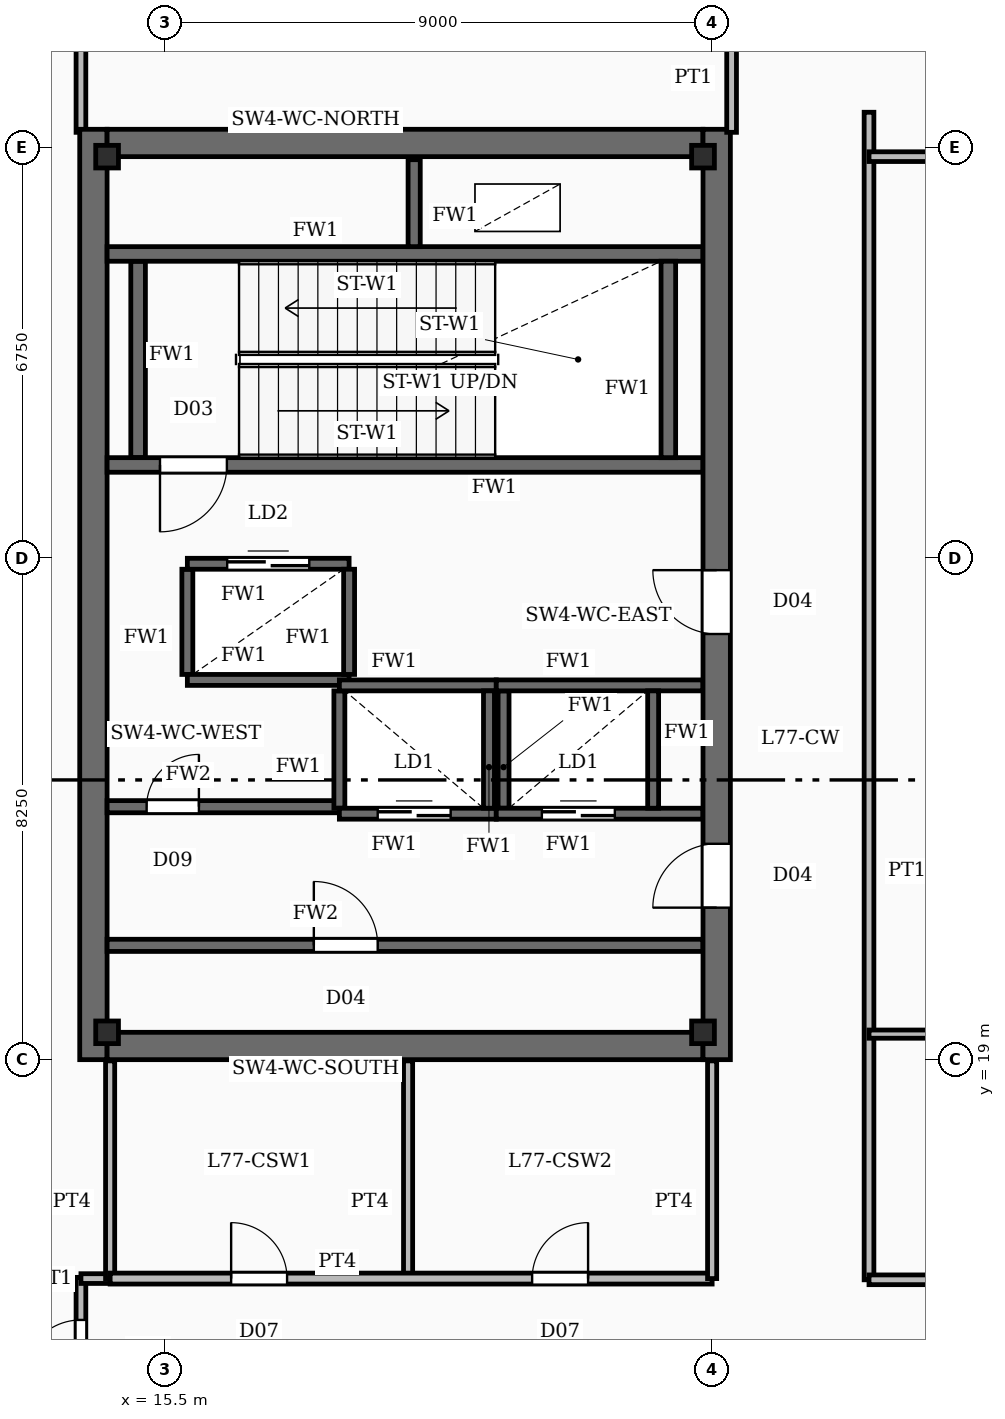
"""IFC4 building model, lengths in metres.
Left out: names, types, materials, properties, quantities, classifications, styles, units other than length and angle.
Written with IfcOpenShell. Run it as: python <this file> out.ifc"""

import sys

from ifc_helpers import new_model, si_unit, direction, frame, frame_2d, origin, origin_2d, place, context, subcontext, project, spatial, rectangle, i_section, extrude, element, fill, save


model = new_model("IFC4")
c1 = context("Model", 3, precision=1e-05, world=origin(), true_north=direction((0.0, 1.0)))
c2 = subcontext(c1, "Body", "Model", "MODEL_VIEW")
j1 = project(units=[si_unit("LENGTHUNIT", "METRE"), si_unit("PLANEANGLEUNIT", "RADIAN")], contexts=[c1])
p1 = place(None, origin())
s1 = spatial("IfcSite", under=j1, at=p1, CompositionType="ELEMENT")
p2 = place(p1, origin())
s2 = spatial("IfcBuilding", under=s1, at=p2, CompositionType="ELEMENT")
p3 = place(p2, frame((0.0, 0.0, 312.4)))
s3 = spatial("IfcBuildingStorey", under=s2, at=p3, CompositionType="ELEMENT", Elevation=312.4)
p4 = place(p3, frame((14.325, 19.0, -0.24), z_axis=(0.0, 0.0, 1.0), x_axis=(0.0, 1.0, 0.0)))
e1 = element("IfcWall", 1, at=p4, inside=s3, PredefinedType="SHEAR", context=c2, shape_type="SweptSolid", body=[
    extrude(rectangle(XDim=15.3, YDim=0.45, at=frame_2d((7.65, 0.0))), origin(), (0.0, 0.0, 1.0), 4.8),
])
p5 = place(p3, frame((24.575, 19.0, -0.24), z_axis=(0.0, 0.0, 1.0), x_axis=(0.0, 1.0, 0.0)))
e2 = element("IfcWall", 2, at=p5, inside=s3, PredefinedType="SHEAR", context=c2, shape_type="SweptSolid", body=[
    extrude(rectangle(XDim=15.3, YDim=0.45, at=frame_2d((7.65, 0.0))), origin(), (0.0, 0.0, 1.0), 4.8),
])
p6 = place(p5, frame((2.5, 0.0, 0.24)))
e3 = element("IfcOpeningElement", 3, at=p6, cuts=e2, PredefinedType="OPENING", context=c2, shape_type="SweptSolid", body=[
    extrude(rectangle(XDim=1.05, YDim=2.15, at=frame_2d((0.525, 1.075))), frame((0.0, 0.235, 0.0), z_axis=(0.0, -1.0, 0.0), x_axis=(1.0, 0.0, 0.0)), (0.0, 0.0, 1.0), 0.47),
])
p7 = place(p5, frame((7.0, 0.0, 0.24)))
e4 = element("IfcOpeningElement", 4, at=p7, cuts=e2, PredefinedType="OPENING", context=c2, shape_type="SweptSolid", body=[
    extrude(rectangle(XDim=1.05, YDim=2.15, at=frame_2d((0.525, 1.075))), frame((0.0, 0.235, 0.0), z_axis=(0.0, -1.0, 0.0), x_axis=(1.0, 0.0, 0.0)), (0.0, 0.0, 1.0), 0.47),
])
for number, where, z_axis, x_axis in (
    (5, (14.55, 19.225, -0.24), (0.0, 0.0, 1.0), (1.0, 0.0, 0.0)),
    (6, (14.55, 34.075, -0.24), (0.0, 0.0, 1.0), (1.0, 0.0, 0.0)),
):
    element("IfcWall", number, at=place(p3, frame(where, z_axis=z_axis, x_axis=x_axis)), inside=s3, PredefinedType="SHEAR", context=c2, shape_type="SweptSolid", body=[
        extrude(rectangle(XDim=9.8, YDim=0.45, at=frame_2d((4.9, 0.0))), origin(), (0.0, 0.0, 1.0), 4.8),
    ])
for number, where, z_axis, x_axis in (
    (7, (14.55, 19.45, -0.24), (0.0, 0.0, 1.0), (1.0, 0.0, 0.0)),
    (8, (24.35, 19.45, -0.24), (0.0, 0.0, 1.0), (1.0, 0.0, 0.0)),
    (9, (14.55, 33.85, -0.24), (0.0, 0.0, 1.0), (1.0, 0.0, 0.0)),
    (10, (24.35, 33.85, -0.24), (0.0, 0.0, 1.0), (1.0, 0.0, 0.0)),
):
    element("IfcColumn", number, at=place(p3, frame(where, z_axis=z_axis, x_axis=x_axis)), inside=s3, PredefinedType="COLUMN", context=c2, shape_type="SweptSolid", body=[
        extrude(i_section(OverallWidth=0.374, OverallDepth=0.372, WebThickness=0.016, FlangeThickness=0.026, FilletRadius=0.02, at=origin_2d()), origin(), (0.0, 0.0, 1.0), 4.8),
    ])
p8 = place(p3, frame((24.35, 28.78, 0.0), z_axis=(0.0, 0.0, 1.0), x_axis=(-1.0, 0.0, 0.0)))
e11 = element("IfcWall", 11, at=p8, inside=s3, PredefinedType="SOLIDWALL", context=c2, shape_type="SweptSolid", body=[
    extrude(rectangle(XDim=9.8, YDim=0.24, at=frame_2d((4.9, 0.0))), origin(), (0.0, 0.0, 1.0), 4.56),
])
p9 = place(p8, frame((7.83, 0.0, 0.0)))
e12 = element("IfcOpeningElement", 12, at=p9, cuts=e11, PredefinedType="OPENING", context=c2, shape_type="SweptSolid", body=[
    extrude(rectangle(XDim=1.1, YDim=2.15, at=frame_2d((0.55, 1.075))), frame((0.0, 0.13, 0.0), z_axis=(0.0, -1.0, 0.0), x_axis=(1.0, 0.0, 0.0)), (0.0, 0.0, 1.0), 0.26),
])
p10 = place(p3, frame((14.55, 32.25, 0.0), z_axis=(0.0, 0.0, 1.0), x_axis=(1.0, 0.0, 0.0)))
e13 = element("IfcWall", 13, at=p10, inside=s3, PredefinedType="SOLIDWALL", context=c2, shape_type="SweptSolid", body=[
    extrude(rectangle(XDim=9.8, YDim=0.24, at=frame_2d((4.9, 0.0))), origin(), (0.0, 0.0, 1.0), 4.56),
])
for number, where, z_axis, x_axis in (
    (14, (15.06, 28.9, 0.0), (0.0, 0.0, 1.0), (0.0, 1.0, 0.0)),
    (15, (23.78, 28.9, 0.0), (0.0, 0.0, 1.0), (0.0, 1.0, 0.0)),
):
    element("IfcWall", number, at=place(p3, frame(where, z_axis=z_axis, x_axis=x_axis)), inside=s3, PredefinedType="SOLIDWALL", context=c2, shape_type="SweptSolid", body=[
        extrude(rectangle(XDim=3.23, YDim=0.24, at=frame_2d((1.615, 0.0))), origin(), (0.0, 0.0, 1.0), 4.56),
    ])
p11 = place(p3, frame((19.6, 32.37, 0.0), z_axis=(0.0, 0.0, 1.0), x_axis=(0.0, 1.0, 0.0)))
e16 = element("IfcWall", 16, at=p11, inside=s3, PredefinedType="SOLIDWALL", context=c2, shape_type="SweptSolid", body=[
    extrude(rectangle(XDim=1.43, YDim=0.2, at=frame_2d((0.715, 0.0))), origin(), (0.0, 0.0, 1.0), 4.56),
])
p12 = place(p3, frame((18.37, 25.155, 0.0), z_axis=(0.0, 0.0, 1.0), x_axis=(1.0, 0.0, 0.0)))
e17 = element("IfcWall", 17, at=p12, inside=s3, PredefinedType="SOLIDWALL", context=c2, shape_type="SweptSolid", body=[
    extrude(rectangle(XDim=2.58, YDim=0.18, at=frame_2d((1.29, 0.0))), origin(), (0.0, 0.0, 1.0), 4.56),
])
p13 = place(p3, frame((18.37, 23.045, 0.0), z_axis=(0.0, 0.0, 1.0), x_axis=(1.0, 0.0, 0.0)))
e18 = element("IfcWall", 18, at=p13, inside=s3, PredefinedType="SOLIDWALL", context=c2, shape_type="SweptSolid", body=[
    extrude(rectangle(XDim=2.58, YDim=0.18, at=frame_2d((1.29, 0.0))), origin(), (0.0, 0.0, 1.0), 4.56),
])
p14 = place(p13, frame((0.63, 0.0, 0.0)))
e19 = element("IfcOpeningElement", 19, at=p14, cuts=e18, PredefinedType="OPENING", context=c2, shape_type="SweptSolid", body=[
    extrude(rectangle(XDim=1.2, YDim=2.2, at=frame_2d((0.6, 1.1))), frame((0.0, 0.1, 0.0), z_axis=(0.0, -1.0, 0.0), x_axis=(1.0, 0.0, 0.0)), (0.0, 0.0, 1.0), 0.2),
])
for number, where, z_axis, x_axis in (
    (20, (18.37, 23.135, 0.0), (0.0, 0.0, 1.0), (0.0, 1.0, 0.0)),
    (21, (20.83, 23.135, 0.0), (0.0, 0.0, 1.0), (0.0, 1.0, 0.0)),
):
    element("IfcWall", number, at=place(p3, frame(where, z_axis=z_axis, x_axis=x_axis)), inside=s3, PredefinedType="SOLIDWALL", context=c2, shape_type="SweptSolid", body=[
        extrude(rectangle(XDim=1.93, YDim=0.18, at=frame_2d((0.965, 0.0))), origin(), (0.0, 0.0, 1.0), 4.56),
    ])
p15 = place(p3, frame((20.95, 25.155, 0.0), z_axis=(0.0, 0.0, 1.0), x_axis=(1.0, 0.0, 0.0)))
e22 = element("IfcWall", 22, at=p15, inside=s3, PredefinedType="SOLIDWALL", context=c2, shape_type="SweptSolid", body=[
    extrude(rectangle(XDim=3.4, YDim=0.18, at=frame_2d((1.7, 0.0))), origin(), (0.0, 0.0, 1.0), 4.56),
])
p16 = place(p3, frame((20.95, 23.045, 0.0), z_axis=(0.0, 0.0, 1.0), x_axis=(1.0, 0.0, 0.0)))
e23 = element("IfcWall", 23, at=p16, inside=s3, PredefinedType="SOLIDWALL", context=c2, shape_type="SweptSolid", body=[
    extrude(rectangle(XDim=3.4, YDim=0.18, at=frame_2d((1.7, 0.0))), origin(), (0.0, 0.0, 1.0), 4.56),
])
p17 = place(p16, frame((0.75, 0.0, 0.0)))
e24 = element("IfcOpeningElement", 24, at=p17, cuts=e23, PredefinedType="OPENING", context=c2, shape_type="SweptSolid", body=[
    extrude(rectangle(XDim=1.2, YDim=2.2, at=frame_2d((0.6, 1.1))), frame((0.0, 0.1, 0.0), z_axis=(0.0, -1.0, 0.0), x_axis=(1.0, 0.0, 0.0)), (0.0, 0.0, 1.0), 0.2),
])
for number, where, z_axis, x_axis in (
    (25, (21.07, 23.135, 0.0), (0.0, 0.0, 1.0), (0.0, 1.0, 0.0)),
    (26, (23.53, 23.135, 0.0), (0.0, 0.0, 1.0), (0.0, 1.0, 0.0)),
):
    element("IfcWall", number, at=place(p3, frame(where, z_axis=z_axis, x_axis=x_axis)), inside=s3, PredefinedType="SOLIDWALL", context=c2, shape_type="SweptSolid", body=[
        extrude(rectangle(XDim=1.93, YDim=0.18, at=frame_2d((0.965, 0.0))), origin(), (0.0, 0.0, 1.0), 4.56),
    ])
p18 = place(p3, frame((15.87, 27.155, 0.0), z_axis=(0.0, 0.0, 1.0), x_axis=(1.0, 0.0, 0.0)))
e27 = element("IfcWall", 27, at=p18, inside=s3, PredefinedType="SOLIDWALL", context=c2, shape_type="SweptSolid", body=[
    extrude(rectangle(XDim=2.66, YDim=0.18, at=frame_2d((1.33, 0.0))), origin(), (0.0, 0.0, 1.0), 4.56),
])
p19 = place(p18, frame((0.655, 0.0, 0.0)))
e28 = element("IfcOpeningElement", 28, at=p19, cuts=e27, PredefinedType="OPENING", context=c2, shape_type="SweptSolid", body=[
    extrude(rectangle(XDim=1.35, YDim=2.3, at=frame_2d((0.675, 1.15))), frame((0.0, 0.1, 0.0), z_axis=(0.0, -1.0, 0.0), x_axis=(1.0, 0.0, 0.0)), (0.0, 0.0, 1.0), 0.2),
])
p20 = place(p3, frame((15.87, 25.245, 0.0), z_axis=(0.0, 0.0, 1.0), x_axis=(1.0, 0.0, 0.0)))
e29 = element("IfcWall", 29, at=p20, inside=s3, PredefinedType="SOLIDWALL", context=c2, shape_type="SweptSolid", body=[
    extrude(rectangle(XDim=2.66, YDim=0.18, at=frame_2d((1.33, 0.0))), origin(), (0.0, 0.0, 1.0), 4.56),
])
for number, where, z_axis, x_axis in (
    (30, (15.87, 25.335, 0.0), (0.0, 0.0, 1.0), (0.0, 1.0, 0.0)),
    (31, (18.53, 25.335, 0.0), (0.0, 0.0, 1.0), (0.0, 1.0, 0.0)),
):
    element("IfcWall", number, at=place(p3, frame(where, z_axis=z_axis, x_axis=x_axis)), inside=s3, PredefinedType="SOLIDWALL", context=c2, shape_type="SweptSolid", body=[
        extrude(rectangle(XDim=1.73, YDim=0.18, at=frame_2d((0.865, 0.0))), origin(), (0.0, 0.0, 1.0), 4.56),
    ])
p21 = place(p3, frame((14.55, 20.88, 0.0), z_axis=(0.0, 0.0, 1.0), x_axis=(1.0, 0.0, 0.0)))
e32 = element("IfcWall", 32, at=p21, inside=s3, PredefinedType="SOLIDWALL", context=c2, shape_type="SweptSolid", body=[
    extrude(rectangle(XDim=9.8, YDim=0.2, at=frame_2d((4.9, 0.0))), origin(), (0.0, 0.0, 1.0), 3.62),
])
p22 = place(p21, frame((3.4, 0.0, 0.0)))
e33 = element("IfcOpeningElement", 33, at=p22, cuts=e32, PredefinedType="OPENING", context=c2, shape_type="SweptSolid", body=[
    extrude(rectangle(XDim=1.05, YDim=2.15, at=frame_2d((0.525, 1.075))), frame((0.0, 0.11, 0.0), z_axis=(0.0, -1.0, 0.0), x_axis=(1.0, 0.0, 0.0)), (0.0, 0.0, 1.0), 0.22),
])
p23 = place(p3, frame((14.55, 23.16, 0.0), z_axis=(0.0, 0.0, 1.0), x_axis=(1.0, 0.0, 0.0)))
e34 = element("IfcWall", 34, at=p23, inside=s3, PredefinedType="SOLIDWALL", context=c2, shape_type="SweptSolid", body=[
    extrude(rectangle(XDim=3.82, YDim=0.2, at=frame_2d((1.91, 0.0))), origin(), (0.0, 0.0, 1.0), 3.62),
])
p24 = place(p23, frame((0.65, 0.0, 0.0)))
e35 = element("IfcOpeningElement", 35, at=p24, cuts=e34, PredefinedType="OPENING", context=c2, shape_type="SweptSolid", body=[
    extrude(rectangle(XDim=0.86, YDim=2.05, at=frame_2d((0.43, 1.025))), frame((0.0, 0.11, 0.0), z_axis=(0.0, -1.0, 0.0), x_axis=(1.0, 0.0, 0.0)), (0.0, 0.0, 1.0), 0.22),
])
p25 = place(p3, frame((19.5, 15.4, 0.0), z_axis=(0.0, 0.0, 1.0), x_axis=(0.0, 1.0, 0.0)))
e36 = element("IfcWall", 36, at=p25, inside=s3, PredefinedType="PARTITIONING", context=c2, shape_type="SweptSolid", body=[
    extrude(rectangle(XDim=3.58, YDim=0.15, at=frame_2d((1.79, 0.0))), origin(), (0.0, 0.0, 1.0), 3.62),
])
p26 = place(p3, frame((14.6, 15.4, 0.0), z_axis=(0.0, 0.0, 1.0), x_axis=(1.0, 0.0, 0.0)))
e37 = element("IfcWall", 37, at=p26, inside=s3, PredefinedType="PARTITIONING", context=c2, shape_type="SweptSolid", body=[
    extrude(rectangle(XDim=9.9, YDim=0.18, at=frame_2d((4.95, 0.0))), origin(), (0.0, 0.0, 1.0), 3.62),
])
p27 = place(p26, frame((1.99, 0.0, 0.0)))
e38 = element("IfcOpeningElement", 38, at=p27, cuts=e37, PredefinedType="OPENING", context=c2, shape_type="SweptSolid", body=[
    extrude(rectangle(XDim=0.92, YDim=2.1, at=frame_2d((0.46, 1.05))), frame((0.0, 0.1, 0.0), z_axis=(0.0, -1.0, 0.0), x_axis=(1.0, 0.0, 0.0)), (0.0, 0.0, 1.0), 0.2),
])
p28 = place(p26, frame((6.94, 0.0, 0.0)))
e39 = element("IfcOpeningElement", 39, at=p28, cuts=e37, PredefinedType="OPENING", context=c2, shape_type="SweptSolid", body=[
    extrude(rectangle(XDim=0.92, YDim=2.1, at=frame_2d((0.46, 1.05))), frame((0.0, 0.1, 0.0), z_axis=(0.0, -1.0, 0.0), x_axis=(1.0, 0.0, 0.0)), (0.0, 0.0, 1.0), 0.2),
])
for number, where, z_axis, x_axis in (
    (40, (14.6, 15.4, 0.0), (0.0, 0.0, 1.0), (0.0, 1.0, 0.0)),
    (41, (24.5, 15.4, 0.0), (0.0, 0.0, 1.0), (0.0, 1.0, 0.0)),
):
    element("IfcWall", number, at=place(p3, frame(where, z_axis=z_axis, x_axis=x_axis)), inside=s3, PredefinedType="PARTITIONING", context=c2, shape_type="SweptSolid", body=[
        extrude(rectangle(XDim=3.58, YDim=0.15, at=frame_2d((1.79, 0.0))), origin(), (0.0, 0.0, 1.0), 3.62),
    ])
p29 = place(p3, frame((27.08, 19.42, 0.0), z_axis=(0.0, 0.0, 1.0), x_axis=(1.0, 0.0, 0.0)))
e42 = element("IfcWall", 42, at=p29, inside=s3, PredefinedType="PARTITIONING", context=c2, shape_type="SweptSolid", body=[
    extrude(rectangle(XDim=20.74, YDim=0.135, at=frame_2d((10.37, 0.0))), origin(), (0.0, 0.0, 1.0), 3.62),
])
p30 = place(p29, frame((1.6, 0.0, 0.0)))
e43 = element("IfcOpeningElement", 43, at=p30, cuts=e42, PredefinedType="OPENING", context=c2, shape_type="SweptSolid", body=[
    extrude(rectangle(XDim=1.6, YDim=2.15, at=frame_2d((0.8, 1.075))), frame((0.0, 0.077, 0.0), z_axis=(0.0, -1.0, 0.0), x_axis=(1.0, 0.0, 0.0)), (0.0, 0.0, 1.0), 0.155),
])
p31 = place(p29, frame((14.2, 0.0, 0.0)))
e44 = element("IfcOpeningElement", 44, at=p31, cuts=e42, PredefinedType="OPENING", context=c2, shape_type="SweptSolid", body=[
    extrude(rectangle(XDim=1.6, YDim=2.15, at=frame_2d((0.8, 1.075))), frame((0.0, 0.077, 0.0), z_axis=(0.0, -1.0, 0.0), x_axis=(1.0, 0.0, 0.0)), (0.0, 0.0, 1.0), 0.155),
])
p32 = place(p3, frame((27.08, 33.85, 0.0), z_axis=(0.0, 0.0, 1.0), x_axis=(1.0, 0.0, 0.0)))
e45 = element("IfcWall", 45, at=p32, inside=s3, PredefinedType="PARTITIONING", context=c2, shape_type="SweptSolid", body=[
    extrude(rectangle(XDim=20.74, YDim=0.16, at=frame_2d((10.37, 0.0))), origin(), (0.0, 0.0, 1.0), 3.62),
])
p33 = place(p3, frame((27.08, 15.38, 0.0), z_axis=(0.0, 0.0, 1.0), x_axis=(1.0, 0.0, 0.0)))
e46 = element("IfcWall", 46, at=p33, inside=s3, PredefinedType="PARTITIONING", context=c2, shape_type="SweptSolid", body=[
    extrude(rectangle(XDim=20.74, YDim=0.16, at=frame_2d((10.37, 0.0))), origin(), (0.0, 0.0, 1.0), 3.62),
])
p34 = place(p33, frame((9.5, 0.0, 0.0)))
e47 = element("IfcOpeningElement", 47, at=p34, cuts=e46, PredefinedType="OPENING", context=c2, shape_type="SweptSolid", body=[
    extrude(rectangle(XDim=1.6, YDim=2.15, at=frame_2d((0.8, 1.075))), frame((0.0, 0.09, 0.0), z_axis=(0.0, -1.0, 0.0), x_axis=(1.0, 0.0, 0.0)), (0.0, 0.0, 1.0), 0.18),
])
p35 = place(p3, frame((27.08, 15.38, 0.0), z_axis=(0.0, 0.0, 1.0), x_axis=(0.0, 1.0, 0.0)))
e48 = element("IfcWall", 48, at=p35, inside=s3, PredefinedType="PARTITIONING", context=c2, shape_type="SweptSolid", body=[
    extrude(rectangle(XDim=19.2, YDim=0.16, at=frame_2d((9.6, 0.0))), origin(), (0.0, 0.0, 1.0), 3.62),
])
p36 = place(p3, frame((24.82, 34.25, 0.0), z_axis=(0.0, 0.0, 1.0), x_axis=(0.0, 1.0, 0.0)))
e49 = element("IfcWall", 49, at=p36, inside=s3, PredefinedType="PARTITIONING", context=c2, shape_type="SweptSolid", body=[
    extrude(rectangle(XDim=2.57, YDim=0.16, at=frame_2d((1.285, 0.0))), origin(), (0.0, 0.0, 1.0), 3.62),
])
p37 = place(p3, frame((14.12, 15.4, 0.0), z_axis=(0.0, 0.0, 1.0), x_axis=(1.0, 0.0, 0.0)))
e50 = element("IfcWall", 50, at=p37, inside=s3, PredefinedType="PARTITIONING", context=c2, shape_type="SweptSolid", body=[
    extrude(rectangle(XDim=0.5, YDim=0.16, at=frame_2d((0.25, 0.0))), origin(), (0.0, 0.0, 1.0), 3.62),
])
p38 = place(p3, frame((14.12, 34.25, 0.0), z_axis=(0.0, 0.0, 1.0), x_axis=(0.0, 1.0, 0.0)))
e51 = element("IfcWall", 51, at=p38, inside=s3, PredefinedType="PARTITIONING", context=c2, shape_type="SweptSolid", body=[
    extrude(rectangle(XDim=17.168, YDim=0.16, at=frame_2d((8.584, 0.0))), origin(), (0.0, 0.0, 1.0), 3.62),
])
p39 = place(p3, frame((14.12, 13.12, 0.0), z_axis=(0.0, 0.0, 1.0), x_axis=(0.0, 1.0, 0.0)))
e52 = element("IfcWall", 52, at=p39, inside=s3, PredefinedType="PARTITIONING", context=c2, shape_type="SweptSolid", body=[
    extrude(rectangle(XDim=2.3, YDim=0.16, at=frame_2d((1.15, 0.0))), origin(), (0.0, 0.0, 1.0), 3.62),
])
p40 = place(p39, frame((0.65, 0.0, 0.0)))
e53 = element("IfcOpeningElement", 53, at=p40, cuts=e52, PredefinedType="OPENING", context=c2, shape_type="SweptSolid", body=[
    extrude(rectangle(XDim=0.95, YDim=2.15, at=frame_2d((0.475, 1.075))), frame((0.0, 0.09, 0.0), z_axis=(0.0, -1.0, 0.0), x_axis=(1.0, 0.0, 0.0)), (0.0, 0.0, 1.0), 0.18),
])
p41 = place(p6, origin())
e54 = element("IfcDoor", 54, at=p41, inside=s3, OperationType="SINGLE_SWING_LEFT", PredefinedType="DOOR", context=c2, shape_type="SweptSolid", body=[
    extrude(rectangle(XDim=1.05, YDim=2.15, at=frame_2d((0.525, 1.075))), frame((0.0, 0.025, 0.0), z_axis=(0.0, -1.0, 0.0), x_axis=(1.0, 0.0, 0.0)), (0.0, 0.0, 1.0), 0.05),
])
fill(e3, e54)
p42 = place(p7, origin())
e55 = element("IfcDoor", 55, at=p42, inside=s3, OperationType="SINGLE_SWING_RIGHT", PredefinedType="DOOR", context=c2, shape_type="SweptSolid", body=[
    extrude(rectangle(XDim=1.05, YDim=2.15, at=frame_2d((0.525, 1.075))), frame((0.0, 0.025, 0.0), z_axis=(0.0, -1.0, 0.0), x_axis=(1.0, 0.0, 0.0)), (0.0, 0.0, 1.0), 0.05),
])
fill(e4, e55)
p43 = place(p9, origin())
e56 = element("IfcDoor", 56, at=p43, inside=s3, OperationType="SINGLE_SWING_RIGHT", PredefinedType="DOOR", context=c2, shape_type="SweptSolid", body=[
    extrude(rectangle(XDim=1.1, YDim=2.15, at=frame_2d((0.55, 1.075))), frame((0.0, 0.025, 0.0), z_axis=(0.0, -1.0, 0.0), x_axis=(1.0, 0.0, 0.0)), (0.0, 0.0, 1.0), 0.05),
])
fill(e12, e56)
p44 = place(p14, origin())
e57 = element("IfcDoor", 57, at=p44, inside=s3, OperationType="DOUBLE_DOOR_SLIDING", PredefinedType="DOOR", context=c2, shape_type="SweptSolid", body=[
    extrude(rectangle(XDim=1.2, YDim=2.2, at=frame_2d((0.6, 1.1))), frame((0.0, 0.025, 0.0), z_axis=(0.0, -1.0, 0.0), x_axis=(1.0, 0.0, 0.0)), (0.0, 0.0, 1.0), 0.05),
])
fill(e19, e57)
p45 = place(p17, origin())
e58 = element("IfcDoor", 58, at=p45, inside=s3, OperationType="DOUBLE_DOOR_SLIDING", PredefinedType="DOOR", context=c2, shape_type="SweptSolid", body=[
    extrude(rectangle(XDim=1.2, YDim=2.2, at=frame_2d((0.6, 1.1))), frame((0.0, 0.025, 0.0), z_axis=(0.0, -1.0, 0.0), x_axis=(1.0, 0.0, 0.0)), (0.0, 0.0, 1.0), 0.05),
])
fill(e24, e58)
p46 = place(p19, origin())
e59 = element("IfcDoor", 59, at=p46, inside=s3, OperationType="DOUBLE_DOOR_SLIDING", PredefinedType="DOOR", context=c2, shape_type="SweptSolid", body=[
    extrude(rectangle(XDim=1.35, YDim=2.3, at=frame_2d((0.675, 1.15))), frame((0.0, 0.025, 0.0), z_axis=(0.0, -1.0, 0.0), x_axis=(1.0, 0.0, 0.0)), (0.0, 0.0, 1.0), 0.05),
])
fill(e28, e59)
p47 = place(p22, origin())
e60 = element("IfcDoor", 60, at=p47, inside=s3, OperationType="SINGLE_SWING_LEFT", PredefinedType="DOOR", context=c2, shape_type="SweptSolid", body=[
    extrude(rectangle(XDim=1.05, YDim=2.15, at=frame_2d((0.525, 1.075))), frame((0.0, 0.025, 0.0), z_axis=(0.0, -1.0, 0.0), x_axis=(1.0, 0.0, 0.0)), (0.0, 0.0, 1.0), 0.05),
])
fill(e33, e60)
p48 = place(p24, origin())
e61 = element("IfcDoor", 61, at=p48, inside=s3, OperationType="SINGLE_SWING_RIGHT", PredefinedType="DOOR", context=c2, shape_type="SweptSolid", body=[
    extrude(rectangle(XDim=0.86, YDim=2.05, at=frame_2d((0.43, 1.025))), frame((0.0, 0.025, 0.0), z_axis=(0.0, -1.0, 0.0), x_axis=(1.0, 0.0, 0.0)), (0.0, 0.0, 1.0), 0.05),
])
fill(e35, e61)
p49 = place(p27, origin())
e62 = element("IfcDoor", 62, at=p49, inside=s3, OperationType="SINGLE_SWING_LEFT", PredefinedType="DOOR", context=c2, shape_type="SweptSolid", body=[
    extrude(rectangle(XDim=0.92, YDim=2.1, at=frame_2d((0.46, 1.05))), frame((0.0, 0.025, 0.0), z_axis=(0.0, -1.0, 0.0), x_axis=(1.0, 0.0, 0.0)), (0.0, 0.0, 1.0), 0.05),
])
fill(e38, e62)
p50 = place(p28, origin())
e63 = element("IfcDoor", 63, at=p50, inside=s3, OperationType="SINGLE_SWING_RIGHT", PredefinedType="DOOR", context=c2, shape_type="SweptSolid", body=[
    extrude(rectangle(XDim=0.92, YDim=2.1, at=frame_2d((0.46, 1.05))), frame((0.0, 0.025, 0.0), z_axis=(0.0, -1.0, 0.0), x_axis=(1.0, 0.0, 0.0)), (0.0, 0.0, 1.0), 0.05),
])
fill(e39, e63)
p51 = place(p40, origin())
e64 = element("IfcDoor", 64, at=p51, inside=s3, OperationType="SINGLE_SWING_LEFT", PredefinedType="DOOR", context=c2, shape_type="SweptSolid", body=[
    extrude(rectangle(XDim=0.95, YDim=2.15, at=frame_2d((0.475, 1.075))), frame((0.0, 0.025, 0.0), z_axis=(0.0, -1.0, 0.0), x_axis=(1.0, 0.0, 0.0)), (0.0, 0.0, 1.0), 0.05),
])
fill(e53, e64)
save(model, sys.argv[1])
